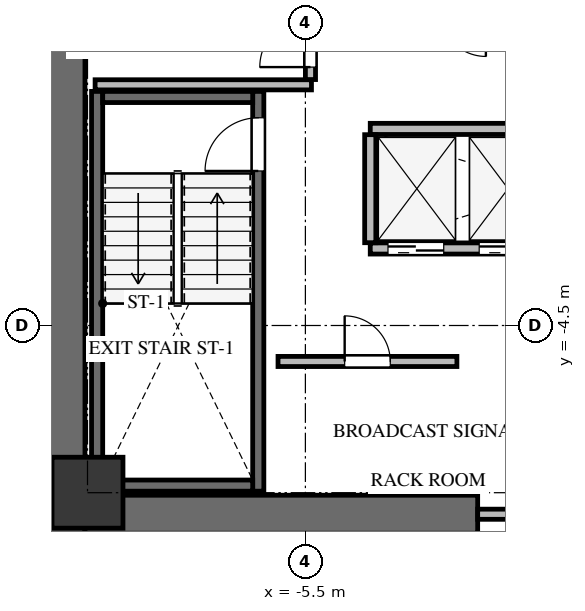
"""IFC4 building model, lengths in metres.
Left out: names, types, materials, properties, quantities, classifications, styles, units other than length and angle.
Written with IfcOpenShell. Run it as: python <this file> out.ifc"""

import sys

from ifc_helpers import new_model, si_unit, direction, frame, frame_2d, origin, origin_2d, place, context, subcontext, project, spatial, rectangle, extrude, source, transform, mapped, element, fill, save


model = new_model("IFC4")
c1 = context("Model", 3, precision=1e-05, world=origin(), true_north=direction((0.0, 1.0)))
c2 = subcontext(c1, "Body", "Model", "MODEL_VIEW")
j1 = project(units=[si_unit("LENGTHUNIT", "METRE"), si_unit("PLANEANGLEUNIT", "RADIAN")], contexts=[c1])
p1 = place(None, origin())
s1 = spatial("IfcSite", under=j1, at=p1, CompositionType="ELEMENT")
p2 = place(p1, origin())
s2 = spatial("IfcBuilding", under=s1, at=p2, CompositionType="ELEMENT")
p3 = place(p2, frame((0.0, 0.0, 100.8)))
s3 = spatial("IfcBuildingStorey", under=s2, at=p3, CompositionType="ELEMENT", Elevation=100.8)
p4 = place(p3, frame((-10.225, -8.6, 0.0), z_axis=(0.0, 0.0, 1.0), x_axis=(0.0, 1.0, 0.0)))
e1 = element("IfcWall", 1, at=p4, inside=s3, PredefinedType="SHEAR", context=c2, shape_type="SweptSolid", body=[
    extrude(rectangle(XDim=17.2, YDim=0.75, at=frame_2d((8.6, 0.0))), origin(), (0.0, 0.0, 1.0), 3.3),
])
p5 = place(p3, frame((-9.85, -8.225, 0.0), z_axis=(0.0, 0.0, 1.0), x_axis=(1.0, 0.0, 0.0)))
e2 = element("IfcWall", 2, at=p5, inside=s3, PredefinedType="SHEAR", context=c2, shape_type="SweptSolid", body=[
    extrude(rectangle(XDim=7.75, YDim=0.75, at=frame_2d((3.875, 0.0))), origin(), (0.0, 0.0, 1.0), 3.3),
])
p6 = place(p3, frame((-6.43, -7.77, -0.24), z_axis=(0.0, 0.0, 1.0), x_axis=(0.0, 1.0, 0.0)))
e3 = element("IfcWall", 3, at=p6, inside=s3, PredefinedType="SHEAR", context=c2, shape_type="SweptSolid", body=[
    extrude(rectangle(XDim=7.89, YDim=0.22, at=frame_2d((3.945, 0.0))), origin(), (0.0, 0.0, 1.0), 3.3),
])
p7 = place(p6, frame((6.32, 0.0, 0.0)))
e4 = element("IfcOpeningElement", 4, at=p7, cuts=e3, PredefinedType="OPENING", context=c2, shape_type="SweptSolid", body=[
    extrude(rectangle(XDim=1.05, YDim=2.15, at=frame_2d((0.525, 1.075))), frame((0.0, 0.12, 0.0), z_axis=(0.0, -1.0, 0.0), x_axis=(1.0, 0.0, 0.0)), (0.0, 0.0, 1.0), 0.24),
])
p8 = place(p3, frame((-9.61, 0.12, -0.24), z_axis=(0.0, 0.0, 1.0), x_axis=(0.0, -1.0, 0.0)))
e5 = element("IfcWall", 5, at=p8, inside=s3, PredefinedType="SHEAR", context=c2, shape_type="SweptSolid", body=[
    extrude(rectangle(XDim=7.89, YDim=0.22, at=frame_2d((3.945, 0.0))), origin(), (0.0, 0.0, 1.0), 3.3),
])
for number, where, z_axis, x_axis in (
    (6, (-9.5, -7.66, -0.24), (0.0, 0.0, 1.0), (1.0, 0.0, 0.0)),
    (7, (-6.54, 0.01, -0.24), (0.0, 0.0, 1.0), (-1.0, 0.0, 0.0)),
):
    element("IfcWall", number, at=place(p3, frame(where, z_axis=z_axis, x_axis=x_axis)), inside=s3, PredefinedType="SHEAR", context=c2, shape_type="SweptSolid", body=[
        extrude(rectangle(XDim=2.96, YDim=0.22, at=frame_2d((1.48, 0.0))), origin(), (0.0, 0.0, 1.0), 3.3),
    ])
m1 = source(origin(), c2, "Body", "SweptSolid", [
    extrude(rectangle(XDim=1.4, YDim=1.4, at=origin_2d()), origin(), (0.0, 0.0, 1.0), 3.3),
])
p9 = place(p3, frame((-9.8, -7.8, -0.24), z_axis=(0.0, 0.0, 1.0), x_axis=(1.0, 0.0, 0.0)))
e8 = element("IfcColumn", 8, at=p9, inside=s3, PredefinedType="COLUMN", context=c2, shape_type="MappedRepresentation", body=[
    mapped(m1, transform((0.0, 0.0, 0.0), x_axis=(1.0, 0.0, 0.0), y_axis=(0.0, 1.0, 0.0), z_axis=(0.0, 0.0, 1.0), scale=1.0)),
])
p10 = place(p3, frame((-2.1, -8.225, 0.0), z_axis=(0.0, 0.0, 1.0), x_axis=(1.0, 0.0, 0.0)))
e9 = element("IfcWall", 9, at=p10, inside=s3, PredefinedType="SOLIDWALL", context=c2, shape_type="SweptSolid", body=[
    extrude(rectangle(XDim=4.2, YDim=0.2, at=frame_2d((2.1, 0.0))), origin(), (0.0, 0.0, 1.0), 3.045),
])
p11 = place(p10, frame((1.2, 0.0, 0.0)))
e10 = element("IfcOpeningElement", 10, at=p11, cuts=e9, PredefinedType="OPENING", context=c2, shape_type="SweptSolid", body=[
    extrude(rectangle(XDim=1.8, YDim=2.15, at=frame_2d((0.9, 1.075))), frame((0.0, 0.11, 0.0), z_axis=(0.0, -1.0, 0.0), x_axis=(1.0, 0.0, 0.0)), (0.0, 0.0, 1.0), 0.22),
])
p12 = place(p3, frame((-9.65, 0.25, 0.0), z_axis=(0.0, 0.0, 1.0), x_axis=(1.0, 0.0, 0.0)))
e11 = element("IfcWall", 11, at=p12, inside=s3, PredefinedType="SOLIDWALL", context=c2, shape_type="SweptSolid", body=[
    extrude(rectangle(XDim=4.27, YDim=0.2, at=frame_2d((2.135, 0.0))), origin(), (0.0, 0.0, 1.0), 3.045),
])
p13 = place(p3, frame((-5.4, 0.354, 0.0), z_axis=(0.0, 0.0, 1.0), x_axis=(0.0, 1.0, 0.0)))
e12 = element("IfcWall", 12, at=p13, inside=s3, PredefinedType="SOLIDWALL", context=c2, shape_type="SweptSolid", body=[
    extrude(rectangle(XDim=4.026, YDim=0.2, at=frame_2d((2.013, 0.0))), origin(), (0.0, 0.0, 1.0), 3.045),
])
p14 = place(p13, frame((0.246, 0.0, 0.0)))
e13 = element("IfcOpeningElement", 13, at=p14, cuts=e12, PredefinedType="OPENING", context=c2, shape_type="SweptSolid", body=[
    extrude(rectangle(XDim=1.0, YDim=2.15, at=frame_2d((0.5, 1.075))), frame((0.0, 0.11, 0.0), z_axis=(0.0, -1.0, 0.0), x_axis=(1.0, 0.0, 0.0)), (0.0, 0.0, 1.0), 0.22),
])
p15 = place(p3, frame((-4.22, -2.98, 0.0), z_axis=(0.0, 0.0, 1.0), x_axis=(1.0, 0.0, 0.0)))
e14 = element("IfcWall", 14, at=p15, inside=s3, PredefinedType="SOLIDWALL", context=c2, shape_type="SweptSolid", body=[
    extrude(rectangle(XDim=7.24, YDim=0.22, at=frame_2d((3.62, 0.0))), origin(), (0.0, 0.0, 1.0), 3.045),
])
p16 = place(p15, frame((0.35, 0.0, 0.0)))
e15 = element("IfcOpeningElement", 15, at=p16, cuts=e14, PredefinedType="OPENING", context=c2, shape_type="SweptSolid", body=[
    extrude(rectangle(XDim=1.1, YDim=2.15, at=frame_2d((0.55, 1.075))), frame((0.0, 0.12, 0.0), z_axis=(0.0, -1.0, 0.0), x_axis=(1.0, 0.0, 0.0)), (0.0, 0.0, 1.0), 0.24),
])
p17 = place(p15, frame((2.15, 0.0, 0.0)))
e16 = element("IfcOpeningElement", 16, at=p17, cuts=e14, PredefinedType="OPENING", context=c2, shape_type="SweptSolid", body=[
    extrude(rectangle(XDim=1.1, YDim=2.15, at=frame_2d((0.55, 1.075))), frame((0.0, 0.12, 0.0), z_axis=(0.0, -1.0, 0.0), x_axis=(1.0, 0.0, 0.0)), (0.0, 0.0, 1.0), 0.24),
])
p18 = place(p15, frame((3.95, 0.0, 0.0)))
e17 = element("IfcOpeningElement", 17, at=p18, cuts=e14, PredefinedType="OPENING", context=c2, shape_type="SweptSolid", body=[
    extrude(rectangle(XDim=1.1, YDim=2.15, at=frame_2d((0.55, 1.075))), frame((0.0, 0.12, 0.0), z_axis=(0.0, -1.0, 0.0), x_axis=(1.0, 0.0, 0.0)), (0.0, 0.0, 1.0), 0.24),
])
p19 = place(p15, frame((5.75, 0.0, 0.0)))
e18 = element("IfcOpeningElement", 18, at=p19, cuts=e14, PredefinedType="OPENING", context=c2, shape_type="SweptSolid", body=[
    extrude(rectangle(XDim=1.1, YDim=2.15, at=frame_2d((0.55, 1.075))), frame((0.0, 0.12, 0.0), z_axis=(0.0, -1.0, 0.0), x_axis=(1.0, 0.0, 0.0)), (0.0, 0.0, 1.0), 0.24),
])
p20 = place(p3, frame((-4.22, -0.62, 0.0), z_axis=(0.0, 0.0, 1.0), x_axis=(1.0, 0.0, 0.0)))
e19 = element("IfcWall", 19, at=p20, inside=s3, PredefinedType="SOLIDWALL", context=c2, shape_type="SweptSolid", body=[
    extrude(rectangle(XDim=7.24, YDim=0.22, at=frame_2d((3.62, 0.0))), origin(), (0.0, 0.0, 1.0), 3.045),
])
p21 = place(p3, frame((-4.22, -2.866, 0.0), z_axis=(0.0, 0.0, 1.0), x_axis=(0.0, 1.0, 0.0)))
e20 = element("IfcWall", 20, at=p21, inside=s3, PredefinedType="SOLIDWALL", context=c2, shape_type="SweptSolid", body=[
    extrude(rectangle(XDim=2.132, YDim=0.22, at=frame_2d((1.066, 0.0))), origin(), (0.0, 0.0, 1.0), 3.045),
])
p22 = place(p3, frame((-6.04, -5.21, 0.0), z_axis=(0.0, 0.0, 1.0), x_axis=(1.0, 0.0, 0.0)))
e21 = element("IfcWall", 21, at=p22, inside=s3, PredefinedType="SOLIDWALL", context=c2, shape_type="SweptSolid", body=[
    extrude(rectangle(XDim=3.53, YDim=0.2, at=frame_2d((1.765, 0.0))), origin(), (0.0, 0.0, 1.0), 3.045),
])
p23 = place(p22, frame((1.315, 0.0, 0.0)))
e22 = element("IfcOpeningElement", 22, at=p23, cuts=e21, PredefinedType="OPENING", context=c2, shape_type="SweptSolid", body=[
    extrude(rectangle(XDim=0.9, YDim=2.05, at=frame_2d((0.45, 1.025))), frame((0.0, 0.11, 0.0), z_axis=(0.0, -1.0, 0.0), x_axis=(1.0, 0.0, 0.0)), (0.0, 0.0, 1.0), 0.22),
])
m2 = source(origin(), c2, "Body", "SweptSolid", [
    extrude(rectangle(XDim=1.05, YDim=2.15, at=frame_2d((0.525, 1.075))), frame((0.0, 0.025, 0.0), z_axis=(0.0, -1.0, 0.0), x_axis=(1.0, 0.0, 0.0)), (0.0, 0.0, 1.0), 0.05),
])
p24 = place(p7, origin())
e23 = element("IfcDoor", 23, at=p24, inside=s3, OperationType="SINGLE_SWING_LEFT", PredefinedType="DOOR", context=c2, shape_type="MappedRepresentation", body=[
    mapped(m2, transform((0.0, 0.0, 0.0), x_axis=(1.0, 0.0, 0.0), y_axis=(0.0, 1.0, 0.0), z_axis=(0.0, 0.0, 1.0), scale=1.0)),
])
fill(e4, e23)
m3 = source(origin(), c2, "Body", "SweptSolid", [
    extrude(rectangle(XDim=1.0, YDim=2.15, at=frame_2d((0.5, 1.075))), frame((0.0, 0.025, 0.0), z_axis=(0.0, -1.0, 0.0), x_axis=(1.0, 0.0, 0.0)), (0.0, 0.0, 1.0), 0.05),
])
p25 = place(p14, origin())
e24 = element("IfcDoor", 24, at=p25, inside=s3, OperationType="SINGLE_SWING_LEFT", PredefinedType="DOOR", context=c2, shape_type="MappedRepresentation", body=[
    mapped(m3, transform((0.0, 0.0, 0.0), x_axis=(1.0, 0.0, 0.0), y_axis=(0.0, 1.0, 0.0), z_axis=(0.0, 0.0, 1.0), scale=1.0)),
])
fill(e13, e24)
m4 = source(origin(), c2, "Body", "SweptSolid", [
    extrude(rectangle(XDim=1.1, YDim=2.15, at=frame_2d((0.55, 1.075))), frame((0.0, 0.025, 0.0), z_axis=(0.0, -1.0, 0.0), x_axis=(1.0, 0.0, 0.0)), (0.0, 0.0, 1.0), 0.05),
])
p26 = place(p16, origin())
e25 = element("IfcDoor", 25, at=p26, inside=s3, OperationType="DOUBLE_DOOR_SLIDING", PredefinedType="DOOR", context=c2, shape_type="MappedRepresentation", body=[
    mapped(m4, transform((0.0, 0.0, 0.0), x_axis=(1.0, 0.0, 0.0), y_axis=(0.0, 1.0, 0.0), z_axis=(0.0, 0.0, 1.0), scale=1.0)),
])
fill(e15, e25)
p27 = place(p17, origin())
e26 = element("IfcDoor", 26, at=p27, inside=s3, OperationType="DOUBLE_DOOR_SLIDING", PredefinedType="DOOR", context=c2, shape_type="MappedRepresentation", body=[
    mapped(m4, transform((0.0, 0.0, 0.0), x_axis=(1.0, 0.0, 0.0), y_axis=(0.0, 1.0, 0.0), z_axis=(0.0, 0.0, 1.0), scale=1.0)),
])
fill(e16, e26)
m5 = source(origin(), c2, "Body", "SweptSolid", [
    extrude(rectangle(XDim=0.9, YDim=2.05, at=frame_2d((0.45, 1.025))), frame((0.0, 0.025, 0.0), z_axis=(0.0, -1.0, 0.0), x_axis=(1.0, 0.0, 0.0)), (0.0, 0.0, 1.0), 0.05),
])
p28 = place(p23, origin())
e27 = element("IfcDoor", 27, at=p28, inside=s3, OperationType="SINGLE_SWING_LEFT", PredefinedType="DOOR", context=c2, shape_type="MappedRepresentation", body=[
    mapped(m5, transform((0.0, 0.0, 0.0), x_axis=(1.0, 0.0, 0.0), y_axis=(0.0, 1.0, 0.0), z_axis=(0.0, 0.0, 1.0), scale=1.0)),
])
fill(e22, e27)
save(model, sys.argv[1])
